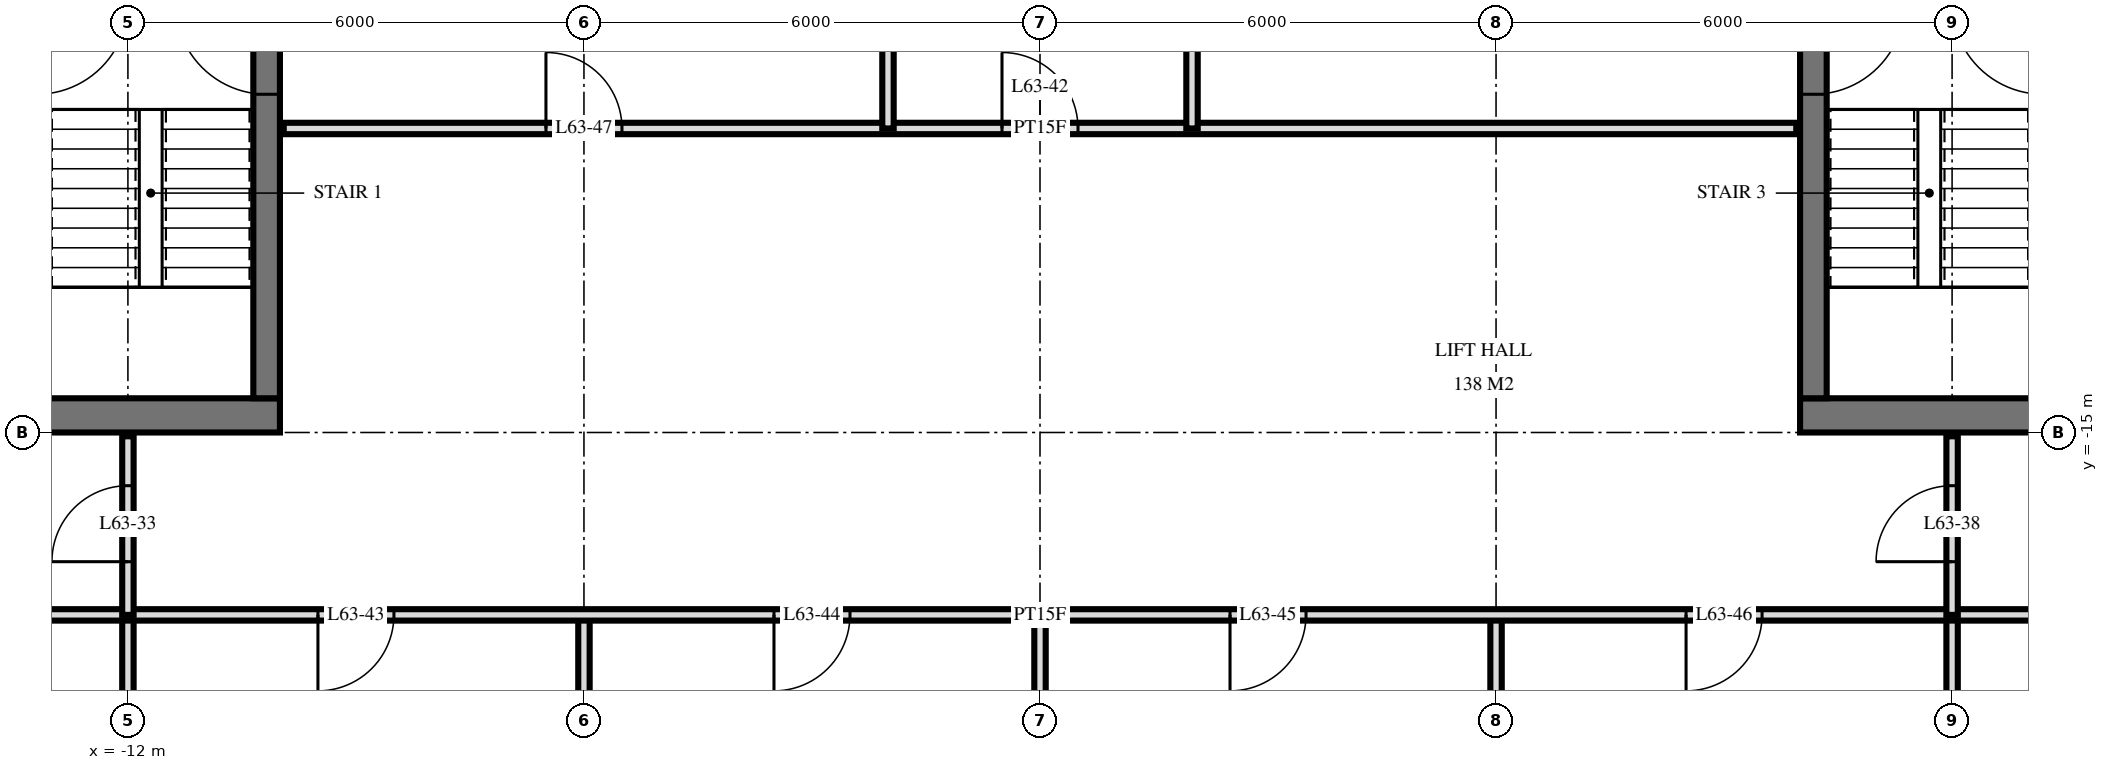
"""IFC4 building model, lengths in metres.
Left out: names, types, materials, properties, quantities, classifications, styles, units other than length and angle.
Written with IfcOpenShell. Run it as: python <this file> out.ifc"""

import sys

from ifc_helpers import new_model, si_unit, direction, frame, frame_2d, origin, place, context, subcontext, project, spatial, rectangle, extrude, element, fill, save


model = new_model("IFC4")
c1 = context("Model", 3, precision=1e-05, world=origin(), true_north=direction((0.0, 1.0)))
c2 = subcontext(c1, "Body", "Model", "MODEL_VIEW")
j1 = project(units=[si_unit("LENGTHUNIT", "METRE"), si_unit("PLANEANGLEUNIT", "RADIAN")], contexts=[c1])
p1 = place(None, origin())
s1 = spatial("IfcSite", under=j1, at=p1, CompositionType="ELEMENT")
p2 = place(p1, origin())
s2 = spatial("IfcBuilding", under=s1, at=p2, CompositionType="ELEMENT")
p3 = place(p2, frame((0.0, 0.0, 239.6)))
s3 = spatial("IfcBuildingStorey", under=s2, at=p3, CompositionType="ELEMENT", Elevation=239.6)
p4 = place(p3, frame((-24.5, -14.775, 0.0), z_axis=(0.0, 0.0, 1.0), x_axis=(1.0, 0.0, 0.0)))
e1 = element("IfcWall", 1, at=p4, inside=s3, PredefinedType="SHEAR", context=c2, shape_type="SweptSolid", body=[
    extrude(rectangle(XDim=14.5, YDim=0.45, at=frame_2d((7.25, 0.0))), origin(), (0.0, 0.0, 1.0), 3.5),
])
p5 = place(p4, frame((6.2, 0.0, 0.0)))
e2 = element("IfcOpeningElement", 2, at=p5, cuts=e1, PredefinedType="OPENING", context=c2, shape_type="SweptSolid", body=[
    extrude(rectangle(XDim=1.2, YDim=2.1, at=frame_2d((0.6, 1.05))), frame((0.0, 0.235, 0.0), z_axis=(0.0, -1.0, 0.0), x_axis=(1.0, 0.0, 0.0)), (0.0, 0.0, 1.0), 0.47),
])
p6 = place(p4, frame((9.25, 0.0, 0.0)))
e3 = element("IfcOpeningElement", 3, at=p6, cuts=e1, PredefinedType="OPENING", context=c2, shape_type="SweptSolid", body=[
    extrude(rectangle(XDim=1.1, YDim=2.1, at=frame_2d((0.55, 1.05))), frame((0.0, 0.235, 0.0), z_axis=(0.0, -1.0, 0.0), x_axis=(1.0, 0.0, 0.0)), (0.0, 0.0, 1.0), 0.47),
])
p7 = place(p4, frame((3.5, 0.0, 0.0)))
e4 = element("IfcOpeningElement", 4, at=p7, cuts=e1, PredefinedType="OPENING", context=c2, shape_type="SweptSolid", body=[
    extrude(rectangle(XDim=0.9, YDim=2.1, at=frame_2d((0.45, 1.05))), frame((0.0, 0.235, 0.0), z_axis=(0.0, -1.0, 0.0), x_axis=(1.0, 0.0, 0.0)), (0.0, 0.0, 1.0), 0.47),
])
p8 = place(p4, frame((1.05, 0.0, 0.0)))
e5 = element("IfcOpeningElement", 5, at=p8, cuts=e1, PredefinedType="OPENING", context=c2, shape_type="SweptSolid", body=[
    extrude(rectangle(XDim=1.0, YDim=2.1, at=frame_2d((0.5, 1.05))), frame((0.0, 0.235, 0.0), z_axis=(0.0, -1.0, 0.0), x_axis=(1.0, 0.0, 0.0)), (0.0, 0.0, 1.0), 0.47),
])
p9 = place(p3, frame((-10.175, -14.55, 0.0), z_axis=(0.0, 0.0, 1.0), x_axis=(0.0, 1.0, 0.0)))
e6 = element("IfcWall", 6, at=p9, inside=s3, PredefinedType="SHEAR", context=c2, shape_type="SweptSolid", body=[
    extrude(rectangle(XDim=14.1, YDim=0.35, at=frame_2d((7.05, 0.0))), origin(), (0.0, 0.0, 1.0), 3.5),
])
p10 = place(p9, frame((8.4, 0.0, 0.0)))
e7 = element("IfcOpeningElement", 7, at=p10, cuts=e6, PredefinedType="OPENING", context=c2, shape_type="SweptSolid", body=[
    extrude(rectangle(XDim=1.4, YDim=2.4, at=frame_2d((0.7, 1.2))), frame((0.0, 0.185, 0.0), z_axis=(0.0, -1.0, 0.0), x_axis=(1.0, 0.0, 0.0)), (0.0, 0.0, 1.0), 0.37),
])
p11 = place(p9, frame((10.0, 0.0, 0.0)))
e8 = element("IfcOpeningElement", 8, at=p11, cuts=e6, PredefinedType="OPENING", context=c2, shape_type="SweptSolid", body=[
    extrude(rectangle(XDim=1.4, YDim=2.4, at=frame_2d((0.7, 1.2))), frame((0.0, 0.185, 0.0), z_axis=(0.0, -1.0, 0.0), x_axis=(1.0, 0.0, 0.0)), (0.0, 0.0, 1.0), 0.37),
])
p12 = place(p9, frame((4.0, 0.0, 0.0)))
e9 = element("IfcOpeningElement", 9, at=p12, cuts=e6, PredefinedType="OPENING", context=c2, shape_type="SweptSolid", body=[
    extrude(rectangle(XDim=1.2, YDim=2.1, at=frame_2d((0.6, 1.05))), frame((0.0, 0.185, 0.0), z_axis=(0.0, -1.0, 0.0), x_axis=(1.0, 0.0, 0.0)), (0.0, 0.0, 1.0), 0.37),
])
p13 = place(p3, frame((10.0, -14.775, 0.0), z_axis=(0.0, 0.0, 1.0), x_axis=(1.0, 0.0, 0.0)))
e10 = element("IfcWall", 10, at=p13, inside=s3, PredefinedType="SHEAR", context=c2, shape_type="SweptSolid", body=[
    extrude(rectangle(XDim=14.5, YDim=0.45, at=frame_2d((7.25, 0.0))), origin(), (0.0, 0.0, 1.0), 3.5),
])
p14 = place(p13, frame((7.1, 0.0, 0.0)))
e11 = element("IfcOpeningElement", 11, at=p14, cuts=e10, PredefinedType="OPENING", context=c2, shape_type="SweptSolid", body=[
    extrude(rectangle(XDim=1.2, YDim=2.1, at=frame_2d((0.6, 1.05))), frame((0.0, 0.235, 0.0), z_axis=(0.0, -1.0, 0.0), x_axis=(1.0, 0.0, 0.0)), (0.0, 0.0, 1.0), 0.47),
])
p15 = place(p13, frame((4.15, 0.0, 0.0)))
e12 = element("IfcOpeningElement", 12, at=p15, cuts=e10, PredefinedType="OPENING", context=c2, shape_type="SweptSolid", body=[
    extrude(rectangle(XDim=1.1, YDim=2.1, at=frame_2d((0.55, 1.05))), frame((0.0, 0.235, 0.0), z_axis=(0.0, -1.0, 0.0), x_axis=(1.0, 0.0, 0.0)), (0.0, 0.0, 1.0), 0.47),
])
p16 = place(p13, frame((10.1, 0.0, 0.0)))
e13 = element("IfcOpeningElement", 13, at=p16, cuts=e10, PredefinedType="OPENING", context=c2, shape_type="SweptSolid", body=[
    extrude(rectangle(XDim=0.9, YDim=2.1, at=frame_2d((0.45, 1.05))), frame((0.0, 0.235, 0.0), z_axis=(0.0, -1.0, 0.0), x_axis=(1.0, 0.0, 0.0)), (0.0, 0.0, 1.0), 0.47),
])
p17 = place(p13, frame((12.45, 0.0, 0.0)))
e14 = element("IfcOpeningElement", 14, at=p17, cuts=e10, PredefinedType="OPENING", context=c2, shape_type="SweptSolid", body=[
    extrude(rectangle(XDim=1.0, YDim=2.1, at=frame_2d((0.5, 1.05))), frame((0.0, 0.235, 0.0), z_axis=(0.0, -1.0, 0.0), x_axis=(1.0, 0.0, 0.0)), (0.0, 0.0, 1.0), 0.47),
])
p18 = place(p3, frame((10.175, -14.55, 0.0), z_axis=(0.0, 0.0, 1.0), x_axis=(0.0, 1.0, 0.0)))
e15 = element("IfcWall", 15, at=p18, inside=s3, PredefinedType="SHEAR", context=c2, shape_type="SweptSolid", body=[
    extrude(rectangle(XDim=14.1, YDim=0.35, at=frame_2d((7.05, 0.0))), origin(), (0.0, 0.0, 1.0), 3.5),
])
p19 = place(p18, frame((8.4, 0.0, 0.0)))
e16 = element("IfcOpeningElement", 16, at=p19, cuts=e15, PredefinedType="OPENING", context=c2, shape_type="SweptSolid", body=[
    extrude(rectangle(XDim=1.4, YDim=2.4, at=frame_2d((0.7, 1.2))), frame((0.0, 0.185, 0.0), z_axis=(0.0, -1.0, 0.0), x_axis=(1.0, 0.0, 0.0)), (0.0, 0.0, 1.0), 0.37),
])
p20 = place(p18, frame((10.0, 0.0, 0.0)))
e17 = element("IfcOpeningElement", 17, at=p20, cuts=e15, PredefinedType="OPENING", context=c2, shape_type="SweptSolid", body=[
    extrude(rectangle(XDim=1.4, YDim=2.4, at=frame_2d((0.7, 1.2))), frame((0.0, 0.185, 0.0), z_axis=(0.0, -1.0, 0.0), x_axis=(1.0, 0.0, 0.0)), (0.0, 0.0, 1.0), 0.37),
])
p21 = place(p18, frame((4.0, 0.0, 0.0)))
e18 = element("IfcOpeningElement", 18, at=p21, cuts=e15, PredefinedType="OPENING", context=c2, shape_type="SweptSolid", body=[
    extrude(rectangle(XDim=1.2, YDim=2.1, at=frame_2d((0.6, 1.05))), frame((0.0, 0.185, 0.0), z_axis=(0.0, -1.0, 0.0), x_axis=(1.0, 0.0, 0.0)), (0.0, 0.0, 1.0), 0.37),
])
p22 = place(p3, frame((12.0, -17.4, 0.0), z_axis=(0.0, 0.0, 1.0), x_axis=(0.0, 1.0, 0.0)))
e19 = element("IfcWall", 19, at=p22, inside=s3, PredefinedType="PARTITIONING", context=c2, shape_type="SweptSolid", body=[
    extrude(rectangle(XDim=2.35, YDim=0.15, at=frame_2d((1.175, 0.0))), origin(), (0.0, 0.0, 1.0), 3.22),
])
p23 = place(p22, frame((0.7, 0.0, 0.0)))
e20 = element("IfcOpeningElement", 20, at=p23, cuts=e19, PredefinedType="OPENING", context=c2, shape_type="SweptSolid", body=[
    extrude(rectangle(XDim=1.0, YDim=2.1, at=frame_2d((0.5, 1.05))), frame((0.0, 0.085, 0.0), z_axis=(0.0, -1.0, 0.0), x_axis=(1.0, 0.0, 0.0)), (0.0, 0.0, 1.0), 0.17),
])
for number, where, z_axis, x_axis in (
    (21, (12.0, -29.22, 0.0), (0.0, 0.0, 1.0), (0.0, 1.0, 0.0)),
    (22, (6.0, -29.22, 0.0), (0.0, 0.0, 1.0), (0.0, 1.0, 0.0)),
):
    element("IfcWall", number, at=place(p3, frame(where, z_axis=z_axis, x_axis=x_axis)), inside=s3, PredefinedType="PARTITIONING", context=c2, shape_type="SweptSolid", body=[
        extrude(rectangle(XDim=11.82, YDim=0.15, at=frame_2d((5.91, 0.0))), origin(), (0.0, 0.0, 1.0), 3.22),
    ])
p24 = place(p3, frame((2.0, -11.0, 0.0), z_axis=(0.0, 0.0, 1.0), x_axis=(0.0, 1.0, 0.0)))
e23 = element("IfcWall", 23, at=p24, inside=s3, PredefinedType="PARTITIONING", context=c2, shape_type="SweptSolid", body=[
    extrude(rectangle(XDim=4.0, YDim=0.15, at=frame_2d((2.0, 0.0))), origin(), (0.0, 0.0, 1.0), 3.22),
])
p25 = place(p3, frame((0.0, -29.22, 0.0), z_axis=(0.0, 0.0, 1.0), x_axis=(0.0, 1.0, 0.0)))
e24 = element("IfcWall", 24, at=p25, inside=s3, PredefinedType="PARTITIONING", context=c2, shape_type="SweptSolid", body=[
    extrude(rectangle(XDim=11.82, YDim=0.15, at=frame_2d((5.91, 0.0))), origin(), (0.0, 0.0, 1.0), 3.22),
])
p26 = place(p3, frame((-2.0, -11.0, 0.0), z_axis=(0.0, 0.0, 1.0), x_axis=(0.0, 1.0, 0.0)))
e25 = element("IfcWall", 25, at=p26, inside=s3, PredefinedType="PARTITIONING", context=c2, shape_type="SweptSolid", body=[
    extrude(rectangle(XDim=4.0, YDim=0.15, at=frame_2d((2.0, 0.0))), origin(), (0.0, 0.0, 1.0), 3.22),
])
p27 = place(p3, frame((-6.0, -29.22, 0.0), z_axis=(0.0, 0.0, 1.0), x_axis=(0.0, 1.0, 0.0)))
e26 = element("IfcWall", 26, at=p27, inside=s3, PredefinedType="PARTITIONING", context=c2, shape_type="SweptSolid", body=[
    extrude(rectangle(XDim=11.82, YDim=0.15, at=frame_2d((5.91, 0.0))), origin(), (0.0, 0.0, 1.0), 3.22),
])
p28 = place(p3, frame((-12.0, -17.4, 0.0), z_axis=(0.0, 0.0, 1.0), x_axis=(0.0, 1.0, 0.0)))
e27 = element("IfcWall", 27, at=p28, inside=s3, PredefinedType="PARTITIONING", context=c2, shape_type="SweptSolid", body=[
    extrude(rectangle(XDim=2.35, YDim=0.15, at=frame_2d((1.175, 0.0))), origin(), (0.0, 0.0, 1.0), 3.22),
])
p29 = place(p28, frame((0.7, 0.0, 0.0)))
e28 = element("IfcOpeningElement", 28, at=p29, cuts=e27, PredefinedType="OPENING", context=c2, shape_type="SweptSolid", body=[
    extrude(rectangle(XDim=1.0, YDim=2.1, at=frame_2d((0.5, 1.05))), frame((0.0, 0.085, 0.0), z_axis=(0.0, -1.0, 0.0), x_axis=(1.0, 0.0, 0.0)), (0.0, 0.0, 1.0), 0.17),
])
p30 = place(p3, frame((-12.0, -29.22, 0.0), z_axis=(0.0, 0.0, 1.0), x_axis=(0.0, 1.0, 0.0)))
e29 = element("IfcWall", 29, at=p30, inside=s3, PredefinedType="PARTITIONING", context=c2, shape_type="SweptSolid", body=[
    extrude(rectangle(XDim=11.82, YDim=0.15, at=frame_2d((5.91, 0.0))), origin(), (0.0, 0.0, 1.0), 3.22),
])
p31 = place(p3, frame((-26.82, -17.4, 0.0), z_axis=(0.0, 0.0, 1.0), x_axis=(1.0, 0.0, 0.0)))
e30 = element("IfcWall", 30, at=p31, inside=s3, PredefinedType="PARTITIONING", context=c2, shape_type="SweptSolid", body=[
    extrude(rectangle(XDim=53.64, YDim=0.15, at=frame_2d((26.82, 0.0))), origin(), (0.0, 0.0, 1.0), 3.22),
])
p32 = place(p31, frame((11.97, 0.0, 0.0)))
e31 = element("IfcOpeningElement", 31, at=p32, cuts=e30, PredefinedType="OPENING", context=c2, shape_type="SweptSolid", body=[
    extrude(rectangle(XDim=1.0, YDim=2.1, at=frame_2d((0.5, 1.05))), frame((0.0, 0.085, 0.0), z_axis=(0.0, -1.0, 0.0), x_axis=(1.0, 0.0, 0.0)), (0.0, 0.0, 1.0), 0.17),
])
p33 = place(p31, frame((3.92, 0.0, 0.0)))
e32 = element("IfcOpeningElement", 32, at=p33, cuts=e30, PredefinedType="OPENING", context=c2, shape_type="SweptSolid", body=[
    extrude(rectangle(XDim=1.0, YDim=2.1, at=frame_2d((0.5, 1.05))), frame((0.0, 0.085, 0.0), z_axis=(0.0, -1.0, 0.0), x_axis=(1.0, 0.0, 0.0)), (0.0, 0.0, 1.0), 0.17),
])
p34 = place(p31, frame((5.72, 0.0, 0.0)))
e33 = element("IfcOpeningElement", 33, at=p34, cuts=e30, PredefinedType="OPENING", context=c2, shape_type="SweptSolid", body=[
    extrude(rectangle(XDim=1.0, YDim=2.1, at=frame_2d((0.5, 1.05))), frame((0.0, 0.085, 0.0), z_axis=(0.0, -1.0, 0.0), x_axis=(1.0, 0.0, 0.0)), (0.0, 0.0, 1.0), 0.17),
])
p35 = place(p31, frame((47.72, 0.0, 0.0)))
e34 = element("IfcOpeningElement", 34, at=p35, cuts=e30, PredefinedType="OPENING", context=c2, shape_type="SweptSolid", body=[
    extrude(rectangle(XDim=1.0, YDim=2.1, at=frame_2d((0.5, 1.05))), frame((0.0, 0.085, 0.0), z_axis=(0.0, -1.0, 0.0), x_axis=(1.0, 0.0, 0.0)), (0.0, 0.0, 1.0), 0.17),
])
p36 = place(p31, frame((51.02, 0.0, 0.0)))
e35 = element("IfcOpeningElement", 35, at=p36, cuts=e30, PredefinedType="OPENING", context=c2, shape_type="SweptSolid", body=[
    extrude(rectangle(XDim=1.0, YDim=2.1, at=frame_2d((0.5, 1.05))), frame((0.0, 0.085, 0.0), z_axis=(0.0, -1.0, 0.0), x_axis=(1.0, 0.0, 0.0)), (0.0, 0.0, 1.0), 0.17),
])
p37 = place(p31, frame((17.32, 0.0, 0.0)))
e36 = element("IfcOpeningElement", 36, at=p37, cuts=e30, PredefinedType="OPENING", context=c2, shape_type="SweptSolid", body=[
    extrude(rectangle(XDim=1.0, YDim=2.1, at=frame_2d((0.5, 1.05))), frame((0.0, 0.085, 0.0), z_axis=(0.0, -1.0, 0.0), x_axis=(1.0, 0.0, 0.0)), (0.0, 0.0, 1.0), 0.17),
])
p38 = place(p31, frame((23.32, 0.0, 0.0)))
e37 = element("IfcOpeningElement", 37, at=p38, cuts=e30, PredefinedType="OPENING", context=c2, shape_type="SweptSolid", body=[
    extrude(rectangle(XDim=1.0, YDim=2.1, at=frame_2d((0.5, 1.05))), frame((0.0, 0.085, 0.0), z_axis=(0.0, -1.0, 0.0), x_axis=(1.0, 0.0, 0.0)), (0.0, 0.0, 1.0), 0.17),
])
p39 = place(p31, frame((29.32, 0.0, 0.0)))
e38 = element("IfcOpeningElement", 38, at=p39, cuts=e30, PredefinedType="OPENING", context=c2, shape_type="SweptSolid", body=[
    extrude(rectangle(XDim=1.0, YDim=2.1, at=frame_2d((0.5, 1.05))), frame((0.0, 0.085, 0.0), z_axis=(0.0, -1.0, 0.0), x_axis=(1.0, 0.0, 0.0)), (0.0, 0.0, 1.0), 0.17),
])
p40 = place(p31, frame((35.32, 0.0, 0.0)))
e39 = element("IfcOpeningElement", 39, at=p40, cuts=e30, PredefinedType="OPENING", context=c2, shape_type="SweptSolid", body=[
    extrude(rectangle(XDim=1.0, YDim=2.1, at=frame_2d((0.5, 1.05))), frame((0.0, 0.085, 0.0), z_axis=(0.0, -1.0, 0.0), x_axis=(1.0, 0.0, 0.0)), (0.0, 0.0, 1.0), 0.17),
])
p41 = place(p3, frame((-9.95, -11.0, 0.0), z_axis=(0.0, 0.0, 1.0), x_axis=(1.0, 0.0, 0.0)))
e40 = element("IfcWall", 40, at=p41, inside=s3, PredefinedType="PARTITIONING", context=c2, shape_type="SweptSolid", body=[
    extrude(rectangle(XDim=19.9, YDim=0.15, at=frame_2d((9.95, 0.0))), origin(), (0.0, 0.0, 1.0), 3.22),
])
p42 = place(p41, frame((9.45, 0.0, 0.0)))
e41 = element("IfcOpeningElement", 41, at=p42, cuts=e40, PredefinedType="OPENING", context=c2, shape_type="SweptSolid", body=[
    extrude(rectangle(XDim=1.0, YDim=2.1, at=frame_2d((0.5, 1.05))), frame((0.0, 0.085, 0.0), z_axis=(0.0, -1.0, 0.0), x_axis=(1.0, 0.0, 0.0)), (0.0, 0.0, 1.0), 0.17),
])
p43 = place(p41, frame((3.45, 0.0, 0.0)))
e42 = element("IfcOpeningElement", 42, at=p43, cuts=e40, PredefinedType="OPENING", context=c2, shape_type="SweptSolid", body=[
    extrude(rectangle(XDim=1.0, YDim=2.1, at=frame_2d((0.5, 1.05))), frame((0.0, 0.085, 0.0), z_axis=(0.0, -1.0, 0.0), x_axis=(1.0, 0.0, 0.0)), (0.0, 0.0, 1.0), 0.17),
])
p44 = place(p12, origin())
e43 = element("IfcDoor", 43, at=p44, inside=s3, OperationType="SINGLE_SWING_LEFT", PredefinedType="DOOR", context=c2, shape_type="SweptSolid", body=[
    extrude(rectangle(XDim=1.2, YDim=2.1, at=frame_2d((0.6, 1.05))), frame((0.0, 0.025, 0.0), z_axis=(0.0, -1.0, 0.0), x_axis=(1.0, 0.0, 0.0)), (0.0, 0.0, 1.0), 0.05),
])
fill(e9, e43)
p45 = place(p21, frame((0.6, 0.0, 0.0), z_axis=(0.0, 0.0, 1.0), x_axis=(-1.0, 0.0, 0.0)))
e44 = element("IfcDoor", 44, at=p45, inside=s3, OperationType="SINGLE_SWING_RIGHT", PredefinedType="DOOR", context=c2, shape_type="SweptSolid", body=[
    extrude(rectangle(XDim=1.2, YDim=2.1, at=frame_2d((0.0, 1.05))), frame((0.0, -0.025, 0.0), z_axis=(0.0, 1.0, 0.0), x_axis=(-1.0, 0.0, 0.0)), (0.0, 0.0, 1.0), 0.05),
])
fill(e18, e44)
p46 = place(p29, origin())
e45 = element("IfcDoor", 45, at=p46, inside=s3, OperationType="SINGLE_SWING_RIGHT", PredefinedType="DOOR", context=c2, shape_type="SweptSolid", body=[
    extrude(rectangle(XDim=1.0, YDim=2.1, at=frame_2d((0.5, 1.05))), frame((0.0, 0.025, 0.0), z_axis=(0.0, -1.0, 0.0), x_axis=(1.0, 0.0, 0.0)), (0.0, 0.0, 1.0), 0.05),
])
fill(e28, e45)
p47 = place(p23, origin())
e46 = element("IfcDoor", 46, at=p47, inside=s3, OperationType="SINGLE_SWING_RIGHT", PredefinedType="DOOR", context=c2, shape_type="SweptSolid", body=[
    extrude(rectangle(XDim=1.0, YDim=2.1, at=frame_2d((0.5, 1.05))), frame((0.0, 0.025, 0.0), z_axis=(0.0, -1.0, 0.0), x_axis=(1.0, 0.0, 0.0)), (0.0, 0.0, 1.0), 0.05),
])
fill(e20, e46)
p48 = place(p42, origin())
e47 = element("IfcDoor", 47, at=p48, inside=s3, OperationType="SINGLE_SWING_RIGHT", PredefinedType="DOOR", context=c2, shape_type="SweptSolid", body=[
    extrude(rectangle(XDim=1.0, YDim=2.1, at=frame_2d((0.5, 1.05))), frame((0.0, 0.025, 0.0), z_axis=(0.0, -1.0, 0.0), x_axis=(1.0, 0.0, 0.0)), (0.0, 0.0, 1.0), 0.05),
])
fill(e41, e47)
p49 = place(p37, frame((0.5, 0.0, 0.0), z_axis=(0.0, 0.0, 1.0), x_axis=(-1.0, 0.0, 0.0)))
e48 = element("IfcDoor", 48, at=p49, inside=s3, OperationType="SINGLE_SWING_LEFT", PredefinedType="DOOR", context=c2, shape_type="SweptSolid", body=[
    extrude(rectangle(XDim=1.0, YDim=2.1, at=frame_2d((0.0, 1.05))), frame((0.0, -0.025, 0.0), z_axis=(0.0, 1.0, 0.0), x_axis=(-1.0, 0.0, 0.0)), (0.0, 0.0, 1.0), 0.05),
])
fill(e36, e48)
p50 = place(p38, frame((0.5, 0.0, 0.0), z_axis=(0.0, 0.0, 1.0), x_axis=(-1.0, 0.0, 0.0)))
e49 = element("IfcDoor", 49, at=p50, inside=s3, OperationType="SINGLE_SWING_LEFT", PredefinedType="DOOR", context=c2, shape_type="SweptSolid", body=[
    extrude(rectangle(XDim=1.0, YDim=2.1, at=frame_2d((0.0, 1.05))), frame((0.0, -0.025, 0.0), z_axis=(0.0, 1.0, 0.0), x_axis=(-1.0, 0.0, 0.0)), (0.0, 0.0, 1.0), 0.05),
])
fill(e37, e49)
p51 = place(p39, frame((0.5, 0.0, 0.0), z_axis=(0.0, 0.0, 1.0), x_axis=(-1.0, 0.0, 0.0)))
e50 = element("IfcDoor", 50, at=p51, inside=s3, OperationType="SINGLE_SWING_LEFT", PredefinedType="DOOR", context=c2, shape_type="SweptSolid", body=[
    extrude(rectangle(XDim=1.0, YDim=2.1, at=frame_2d((0.0, 1.05))), frame((0.0, -0.025, 0.0), z_axis=(0.0, 1.0, 0.0), x_axis=(-1.0, 0.0, 0.0)), (0.0, 0.0, 1.0), 0.05),
])
fill(e38, e50)
p52 = place(p40, frame((0.5, 0.0, 0.0), z_axis=(0.0, 0.0, 1.0), x_axis=(-1.0, 0.0, 0.0)))
e51 = element("IfcDoor", 51, at=p52, inside=s3, OperationType="SINGLE_SWING_LEFT", PredefinedType="DOOR", context=c2, shape_type="SweptSolid", body=[
    extrude(rectangle(XDim=1.0, YDim=2.1, at=frame_2d((0.0, 1.05))), frame((0.0, -0.025, 0.0), z_axis=(0.0, 1.0, 0.0), x_axis=(-1.0, 0.0, 0.0)), (0.0, 0.0, 1.0), 0.05),
])
fill(e39, e51)
p53 = place(p43, origin())
e52 = element("IfcDoor", 52, at=p53, inside=s3, OperationType="SINGLE_SWING_RIGHT", PredefinedType="DOOR", context=c2, shape_type="SweptSolid", body=[
    extrude(rectangle(XDim=1.0, YDim=2.1, at=frame_2d((0.5, 1.05))), frame((0.0, 0.025, 0.0), z_axis=(0.0, -1.0, 0.0), x_axis=(1.0, 0.0, 0.0)), (0.0, 0.0, 1.0), 0.05),
])
fill(e42, e52)
save(model, sys.argv[1])
